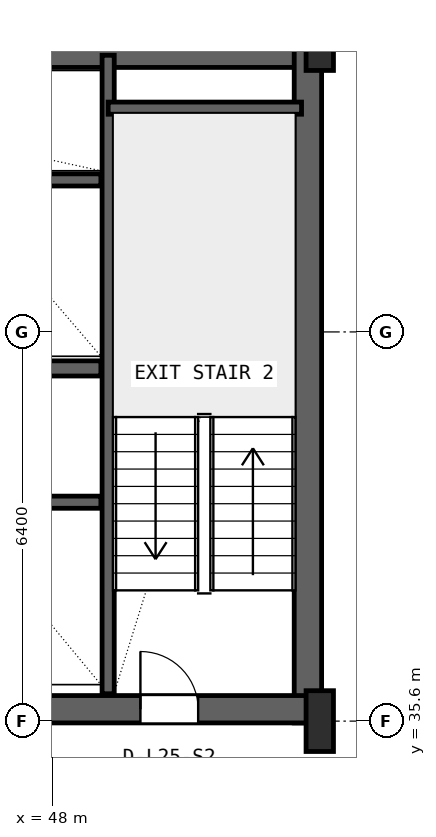
"""IFC4 building model, lengths in metres.
Left out: names, types, materials, properties, quantities, classifications, styles, units other than length and angle.
Written with IfcOpenShell. Run it as: python <this file> out.ifc"""

import sys

from ifc_helpers import new_model, si_unit, direction, frame, frame_2d, origin, origin_2d, place, context, subcontext, project, spatial, rectangle, i_section, extrude, source, transform, mapped, element, fill, save


model = new_model("IFC4")
c1 = context("Model", 3, precision=1e-05, world=origin(), true_north=direction((0.0, 1.0)))
c2 = subcontext(c1, "Body", "Model", "MODEL_VIEW")
j1 = project(units=[si_unit("LENGTHUNIT", "METRE"), si_unit("PLANEANGLEUNIT", "RADIAN")], contexts=[c1])
p1 = place(None, origin())
s1 = spatial("IfcSite", under=j1, at=p1, CompositionType="ELEMENT")
p2 = place(p1, origin())
s2 = spatial("IfcBuilding", under=s1, at=p2, CompositionType="ELEMENT")
p3 = place(p2, frame((0.0, 0.0, 106.8)))
s3 = spatial("IfcBuildingStorey", under=s2, at=p3, CompositionType="ELEMENT", Elevation=106.8)
p4 = place(p3, frame((15.6, 46.575, 0.0), z_axis=(0.0, 0.0, 1.0), x_axis=(1.0, 0.0, 0.0)))
e1 = element("IfcWall", 1, at=p4, inside=s3, PredefinedType="SHEAR", context=c2, shape_type="SweptSolid", body=[
    extrude(rectangle(XDim=36.8, YDim=0.45, at=frame_2d((18.4, 0.0))), origin(), (0.0, 0.0, 1.0), 3.55),
])
p5 = place(p3, frame((52.205, 35.57, 0.0), z_axis=(0.0, 0.0, 1.0), x_axis=(0.0, 1.0, 0.0)))
e2 = element("IfcWall", 2, at=p5, inside=s3, PredefinedType="SHEAR", context=c2, shape_type="SweptSolid", body=[
    extrude(rectangle(XDim=11.23, YDim=0.45, at=frame_2d((5.615, 0.0))), origin(), (0.0, 0.0, 1.0), 3.55),
])
p6 = place(p3, frame((43.2, 35.795, 0.0), z_axis=(0.0, 0.0, 1.0), x_axis=(1.0, 0.0, 0.0)))
e3 = element("IfcWall", 3, at=p6, inside=s3, PredefinedType="SHEAR", context=c2, shape_type="SweptSolid", body=[
    extrude(rectangle(XDim=9.23, YDim=0.45, at=frame_2d((4.615, 0.0))), origin(), (0.0, 0.0, 1.0), 3.55),
])
p7 = place(p6, frame((6.25, 0.0, 0.0)))
e4 = element("IfcOpeningElement", 4, at=p7, cuts=e3, PredefinedType="OPENING", context=c2, shape_type="SweptSolid", body=[
    extrude(rectangle(XDim=0.95, YDim=2.1, at=frame_2d((0.475, 1.05))), frame((0.0, 0.235, 0.0), z_axis=(0.0, -1.0, 0.0), x_axis=(1.0, 0.0, 0.0)), (0.0, 0.0, 1.0), 0.47),
])
m1 = source(origin(), c2, "Body", "SweptSolid", [
    extrude(i_section(OverallWidth=0.45, OverallDepth=1.0, WebThickness=0.016, FlangeThickness=0.03, FilletRadius=0.016, at=origin_2d()), origin(), (0.0, 0.0, 1.0), 3.8),
])
for number, where, z_axis, x_axis in (
    (5, (52.4, 35.6, 0.0), (0.0, 0.0, 1.0), (1.0, 0.0, 0.0)),
    (6, (52.4, 46.8, 0.0), (0.0, 0.0, 1.0), (1.0, 0.0, 0.0)),
):
    element("IfcColumn", number, at=place(p3, frame(where, z_axis=z_axis, x_axis=x_axis)), inside=s3, PredefinedType="COLUMN", context=c2, shape_type="MappedRepresentation", body=[
        mapped(m1, transform((0.0, 0.0, 0.0), x_axis=(1.0, 0.0, 0.0), y_axis=(0.0, 1.0, 0.0), z_axis=(0.0, 0.0, 1.0), scale=1.0)),
    ])
p8 = place(p3, frame((48.92, 36.05, 0.0), z_axis=(0.0, 0.0, 1.0), x_axis=(0.0, 1.0, 0.0)))
e7 = element("IfcWall", 7, at=p8, inside=s3, PredefinedType="SHEAR", context=c2, shape_type="SweptSolid", body=[
    extrude(rectangle(XDim=10.5, YDim=0.2, at=frame_2d((5.25, 0.0))), origin(), (0.0, 0.0, 1.0), 3.55),
])
p9 = place(p3, frame((48.92, 45.68, 0.0), z_axis=(0.0, 0.0, 1.0), x_axis=(1.0, 0.0, 0.0)))
e8 = element("IfcWall", 8, at=p9, inside=s3, PredefinedType="SHEAR", context=c2, shape_type="SweptSolid", body=[
    extrude(rectangle(XDim=3.18, YDim=0.2, at=frame_2d((1.59, 0.0))), origin(), (0.0, 0.0, 1.0), 3.55),
])
p10 = place(p3, frame((24.98, 41.4, 0.0), z_axis=(0.0, 0.0, 1.0), x_axis=(1.0, 0.0, 0.0)))
e9 = element("IfcWall", 9, at=p10, inside=s3, PredefinedType="SHEAR", context=c2, shape_type="SweptSolid", body=[
    extrude(rectangle(XDim=23.82, YDim=0.25, at=frame_2d((11.91, 0.0))), origin(), (0.0, 0.0, 1.0), 3.55),
])
p11 = place(p10, frame((8.87, 0.0, 0.0)))
e10 = element("IfcOpeningElement", 10, at=p11, cuts=e9, PredefinedType="OPENING", context=c2, shape_type="SweptSolid", body=[
    extrude(rectangle(XDim=1.1, YDim=2.18, at=frame_2d((0.55, 1.09))), frame((0.0, 0.135, 0.0), z_axis=(0.0, -1.0, 0.0), x_axis=(1.0, 0.0, 0.0)), (0.0, 0.0, 1.0), 0.27),
])
p12 = place(p10, frame((11.47, 0.0, 0.0)))
e11 = element("IfcOpeningElement", 11, at=p12, cuts=e9, PredefinedType="OPENING", context=c2, shape_type="SweptSolid", body=[
    extrude(rectangle(XDim=1.1, YDim=2.18, at=frame_2d((0.55, 1.09))), frame((0.0, 0.135, 0.0), z_axis=(0.0, -1.0, 0.0), x_axis=(1.0, 0.0, 0.0)), (0.0, 0.0, 1.0), 0.27),
])
p13 = place(p10, frame((14.07, 0.0, 0.0)))
e12 = element("IfcOpeningElement", 12, at=p13, cuts=e9, PredefinedType="OPENING", context=c2, shape_type="SweptSolid", body=[
    extrude(rectangle(XDim=1.1, YDim=2.18, at=frame_2d((0.55, 1.09))), frame((0.0, 0.135, 0.0), z_axis=(0.0, -1.0, 0.0), x_axis=(1.0, 0.0, 0.0)), (0.0, 0.0, 1.0), 0.27),
])
p14 = place(p10, frame((0.96, 0.0, 0.0)))
e13 = element("IfcOpeningElement", 13, at=p14, cuts=e9, PredefinedType="OPENING", context=c2, shape_type="SweptSolid", body=[
    extrude(rectangle(XDim=1.0, YDim=2.08, at=frame_2d((0.5, 1.04))), frame((0.0, 0.135, 0.0), z_axis=(0.0, -1.0, 0.0), x_axis=(1.0, 0.0, 0.0)), (0.0, 0.0, 1.0), 0.27),
])
p15 = place(p10, frame((3.56, 0.0, 0.0)))
e14 = element("IfcOpeningElement", 14, at=p15, cuts=e9, PredefinedType="OPENING", context=c2, shape_type="SweptSolid", body=[
    extrude(rectangle(XDim=1.0, YDim=2.08, at=frame_2d((0.5, 1.04))), frame((0.0, 0.135, 0.0), z_axis=(0.0, -1.0, 0.0), x_axis=(1.0, 0.0, 0.0)), (0.0, 0.0, 1.0), 0.27),
])
p16 = place(p10, frame((6.16, 0.0, 0.0)))
e15 = element("IfcOpeningElement", 15, at=p16, cuts=e9, PredefinedType="OPENING", context=c2, shape_type="SweptSolid", body=[
    extrude(rectangle(XDim=0.92, YDim=2.08, at=frame_2d((0.46, 1.04))), frame((0.0, 0.135, 0.0), z_axis=(0.0, -1.0, 0.0), x_axis=(1.0, 0.0, 0.0)), (0.0, 0.0, 1.0), 0.27),
])
p17 = place(p3, frame((41.22, 44.5, 0.0), z_axis=(0.0, 0.0, 1.0), x_axis=(1.0, 0.0, 0.0)))
e16 = element("IfcWall", 16, at=p17, inside=s3, PredefinedType="SHEAR", context=c2, shape_type="SweptSolid", body=[
    extrude(rectangle(XDim=7.58, YDim=0.2, at=frame_2d((3.79, 0.0))), origin(), (0.0, 0.0, 1.0), 3.55),
])
p18 = place(p3, frame((43.65, 39.2, 0.0), z_axis=(0.0, 0.0, 1.0), x_axis=(1.0, 0.0, 0.0)))
e17 = element("IfcWall", 17, at=p18, inside=s3, PredefinedType="SHEAR", context=c2, shape_type="SweptSolid", body=[
    extrude(rectangle(XDim=5.15, YDim=0.2, at=frame_2d((2.575, 0.0))), origin(), (0.0, 0.0, 1.0), 3.55),
])
m2 = source(origin(), c2, "Body", "SweptSolid", [
    extrude(rectangle(XDim=0.95, YDim=2.1, at=frame_2d((0.475, 1.05))), frame((0.0, 0.025, 0.0), z_axis=(0.0, -1.0, 0.0), x_axis=(1.0, 0.0, 0.0)), (0.0, 0.0, 1.0), 0.05),
])
p19 = place(p7, origin())
e18 = element("IfcDoor", 18, at=p19, inside=s3, OperationType="SINGLE_SWING_LEFT", PredefinedType="DOOR", context=c2, shape_type="MappedRepresentation", body=[
    mapped(m2, transform((0.0, 0.0, 0.0), x_axis=(1.0, 0.0, 0.0), y_axis=(0.0, 1.0, 0.0), z_axis=(0.0, 0.0, 1.0), scale=1.0)),
])
fill(e4, e18)
save(model, sys.argv[1])
